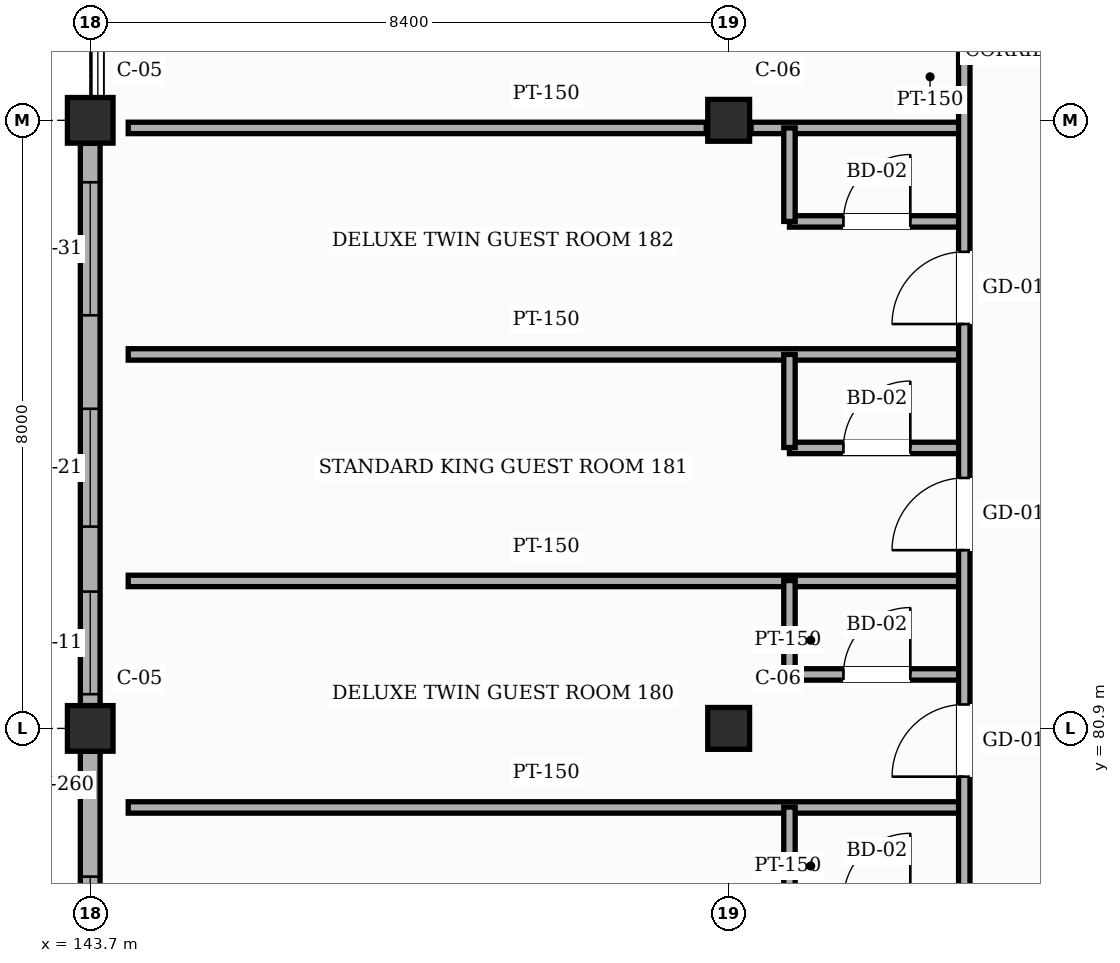
"""IFC4 building model, lengths in metres.
Left out: names, types, materials, properties, quantities, classifications, styles, units other than length and angle.
Written with IfcOpenShell. Run it as: python <this file> out.ifc"""

import sys

from ifc_helpers import new_model, si_unit, direction, frame, frame_2d, origin, origin_2d, place, context, subcontext, project, spatial, rectangle, hollow_rectangle, extrude, element, fill, save


model = new_model("IFC4")
c1 = context("Model", 3, precision=1e-05, world=origin(), true_north=direction((0.0, 1.0)))
c2 = subcontext(c1, "Body", "Model", "MODEL_VIEW")
j1 = project(units=[si_unit("LENGTHUNIT", "METRE"), si_unit("PLANEANGLEUNIT", "RADIAN")], contexts=[c1])
p1 = place(None, origin())
s1 = spatial("IfcSite", under=j1, at=p1, CompositionType="ELEMENT")
p2 = place(p1, origin())
s2 = spatial("IfcBuilding", under=s1, at=p2, CompositionType="ELEMENT")
p3 = place(p2, frame((0.0, 0.0, 31.8)))
s3 = spatial("IfcBuildingStorey", under=s2, at=p3, CompositionType="ELEMENT", Elevation=31.8)
for number, where, z_axis, x_axis in (
    (1, (143.7, 80.9, 0.0), (0.0, 0.0, 1.0), (1.0, 0.0, 0.0)),
    (2, (143.7, 88.9, 0.0), (0.0, 0.0, 1.0), (1.0, 0.0, 0.0)),
):
    element("IfcColumn", number, at=place(p3, frame(where, z_axis=z_axis, x_axis=x_axis)), inside=s3, PredefinedType="COLUMN", context=c2, shape_type="SweptSolid", body=[
        extrude(hollow_rectangle(XDim=0.6, YDim=0.6, WallThickness=0.025, InnerFilletRadius=0.025, OuterFilletRadius=0.05, at=origin_2d()), origin(), (0.0, 0.0, 1.0), 3.6),
    ])
for number, where, z_axis, x_axis in (
    (3, (152.1, 80.9, 0.0), (0.0, 0.0, 1.0), (1.0, 0.0, 0.0)),
    (4, (152.1, 88.9, 0.0), (0.0, 0.0, 1.0), (1.0, 0.0, 0.0)),
):
    element("IfcColumn", number, at=place(p3, frame(where, z_axis=z_axis, x_axis=x_axis)), inside=s3, PredefinedType="COLUMN", context=c2, shape_type="SweptSolid", body=[
        extrude(hollow_rectangle(XDim=0.55, YDim=0.55, WallThickness=0.022, InnerFilletRadius=0.022, OuterFilletRadius=0.044, at=origin_2d()), origin(), (0.0, 0.0, 1.0), 3.6),
    ])
p4 = place(p3, frame((143.7, 73.65, 0.0), z_axis=(0.0, 0.0, 1.0), x_axis=(0.0, 1.0, 0.0)))
e5 = element("IfcWall", 5, at=p4, inside=s3, PredefinedType="SOLIDWALL", context=c2, shape_type="SweptSolid", body=[
    extrude(rectangle(XDim=6.95, YDim=0.26, at=frame_2d((3.475, 0.0))), origin(), (0.0, 0.0, 1.0), 2.805),
])
p5 = place(p4, frame((0.7, 0.0, 0.85)))
e6 = element("IfcOpeningElement", 6, at=p5, cuts=e5, PredefinedType="OPENING", context=c2, shape_type="SweptSolid", body=[
    extrude(rectangle(XDim=2.1, YDim=1.35, at=frame_2d((1.05, 0.675))), frame((0.0, 0.14, 0.0), z_axis=(0.0, -1.0, 0.0), x_axis=(1.0, 0.0, 0.0)), (0.0, 0.0, 1.0), 0.28),
])
p6 = place(p4, frame((4.15, 0.0, 0.85)))
e7 = element("IfcOpeningElement", 7, at=p6, cuts=e5, PredefinedType="OPENING", context=c2, shape_type="SweptSolid", body=[
    extrude(rectangle(XDim=1.15, YDim=1.35, at=frame_2d((0.575, 0.675))), frame((0.0, 0.14, 0.0), z_axis=(0.0, -1.0, 0.0), x_axis=(1.0, 0.0, 0.0)), (0.0, 0.0, 1.0), 0.28),
])
p7 = place(p3, frame((143.7, 81.2, 0.0), z_axis=(0.0, 0.0, 1.0), x_axis=(0.0, 1.0, 0.0)))
e8 = element("IfcWall", 8, at=p7, inside=s3, PredefinedType="SOLIDWALL", context=c2, shape_type="SweptSolid", body=[
    extrude(rectangle(XDim=7.4, YDim=0.26, at=frame_2d((3.7, 0.0))), origin(), (0.0, 0.0, 1.0), 2.805),
])
p8 = place(p7, frame((0.15, 0.0, 0.85)))
e9 = element("IfcOpeningElement", 9, at=p8, cuts=e8, PredefinedType="OPENING", context=c2, shape_type="SweptSolid", body=[
    extrude(rectangle(XDim=1.35, YDim=1.35, at=frame_2d((0.675, 0.675))), frame((0.0, 0.14, 0.0), z_axis=(0.0, -1.0, 0.0), x_axis=(1.0, 0.0, 0.0)), (0.0, 0.0, 1.0), 0.28),
])
p9 = place(p7, frame((2.355, 0.0, 0.85)))
e10 = element("IfcOpeningElement", 10, at=p9, cuts=e8, PredefinedType="OPENING", context=c2, shape_type="SweptSolid", body=[
    extrude(rectangle(XDim=1.55, YDim=1.35, at=frame_2d((0.775, 0.675))), frame((0.0, 0.14, 0.0), z_axis=(0.0, -1.0, 0.0), x_axis=(1.0, 0.0, 0.0)), (0.0, 0.0, 1.0), 0.28),
])
p10 = place(p7, frame((5.135, 0.0, 0.85)))
e11 = element("IfcOpeningElement", 11, at=p10, cuts=e8, PredefinedType="OPENING", context=c2, shape_type="SweptSolid", body=[
    extrude(rectangle(XDim=1.75, YDim=1.35, at=frame_2d((0.875, 0.675))), frame((0.0, 0.14, 0.0), z_axis=(0.0, -1.0, 0.0), x_axis=(1.0, 0.0, 0.0)), (0.0, 0.0, 1.0), 0.28),
])
p11 = place(p3, frame((144.2, 79.86, 0.0), z_axis=(0.0, 0.0, 1.0), x_axis=(1.0, 0.0, 0.0)))
e12 = element("IfcWall", 12, at=p11, inside=s3, PredefinedType="PARTITIONING", context=c2, shape_type="SweptSolid", body=[
    extrude(rectangle(XDim=11.0, YDim=0.15, at=frame_2d((5.5, 0.0))), origin(), (0.0, 0.0, 1.0), 3.365),
])
p12 = place(p3, frame((152.9, 81.61, 0.0), z_axis=(0.0, 0.0, 1.0), x_axis=(1.0, 0.0, 0.0)))
e13 = element("IfcWall", 13, at=p12, inside=s3, PredefinedType="PARTITIONING", context=c2, shape_type="SweptSolid", body=[
    extrude(rectangle(XDim=2.3, YDim=0.15, at=frame_2d((1.15, 0.0))), origin(), (0.0, 0.0, 1.0), 3.365),
])
p13 = place(p12, frame((0.71, 0.0, 0.0)))
e14 = element("IfcOpeningElement", 14, at=p13, cuts=e13, PredefinedType="OPENING", context=c2, shape_type="SweptSolid", body=[
    extrude(rectangle(XDim=0.88, YDim=2.12, at=frame_2d((0.44, 1.06))), frame((0.0, 0.085, 0.0), z_axis=(0.0, -1.0, 0.0), x_axis=(1.0, 0.0, 0.0)), (0.0, 0.0, 1.0), 0.17),
])
p14 = place(p3, frame((144.2, 82.84, 0.0), z_axis=(0.0, 0.0, 1.0), x_axis=(1.0, 0.0, 0.0)))
e15 = element("IfcWall", 15, at=p14, inside=s3, PredefinedType="PARTITIONING", context=c2, shape_type="SweptSolid", body=[
    extrude(rectangle(XDim=11.0, YDim=0.15, at=frame_2d((5.5, 0.0))), origin(), (0.0, 0.0, 1.0), 3.365),
])
p15 = place(p3, frame((152.9, 84.59, 0.0), z_axis=(0.0, 0.0, 1.0), x_axis=(1.0, 0.0, 0.0)))
e16 = element("IfcWall", 16, at=p15, inside=s3, PredefinedType="PARTITIONING", context=c2, shape_type="SweptSolid", body=[
    extrude(rectangle(XDim=2.3, YDim=0.15, at=frame_2d((1.15, 0.0))), origin(), (0.0, 0.0, 1.0), 3.005),
])
p16 = place(p15, frame((0.71, 0.0, 0.0)))
e17 = element("IfcOpeningElement", 17, at=p16, cuts=e16, PredefinedType="OPENING", context=c2, shape_type="SweptSolid", body=[
    extrude(rectangle(XDim=0.88, YDim=2.12, at=frame_2d((0.44, 1.06))), frame((0.0, 0.085, 0.0), z_axis=(0.0, -1.0, 0.0), x_axis=(1.0, 0.0, 0.0)), (0.0, 0.0, 1.0), 0.17),
])
p17 = place(p3, frame((144.2, 85.82, 0.0), z_axis=(0.0, 0.0, 1.0), x_axis=(1.0, 0.0, 0.0)))
e18 = element("IfcWall", 18, at=p17, inside=s3, PredefinedType="PARTITIONING", context=c2, shape_type="SweptSolid", body=[
    extrude(rectangle(XDim=11.0, YDim=0.15, at=frame_2d((5.5, 0.0))), origin(), (0.0, 0.0, 1.0), 3.365),
])
p18 = place(p3, frame((152.9, 87.57, 0.0), z_axis=(0.0, 0.0, 1.0), x_axis=(1.0, 0.0, 0.0)))
e19 = element("IfcWall", 19, at=p18, inside=s3, PredefinedType="PARTITIONING", context=c2, shape_type="SweptSolid", body=[
    extrude(rectangle(XDim=2.3, YDim=0.15, at=frame_2d((1.15, 0.0))), origin(), (0.0, 0.0, 1.0), 3.365),
])
p19 = place(p18, frame((0.71, 0.0, 0.0)))
e20 = element("IfcOpeningElement", 20, at=p19, cuts=e19, PredefinedType="OPENING", context=c2, shape_type="SweptSolid", body=[
    extrude(rectangle(XDim=0.88, YDim=2.12, at=frame_2d((0.44, 1.06))), frame((0.0, 0.085, 0.0), z_axis=(0.0, -1.0, 0.0), x_axis=(1.0, 0.0, 0.0)), (0.0, 0.0, 1.0), 0.17),
])
p20 = place(p3, frame((144.2, 88.8, 0.0), z_axis=(0.0, 0.0, 1.0), x_axis=(1.0, 0.0, 0.0)))
e21 = element("IfcWall", 21, at=p20, inside=s3, PredefinedType="PARTITIONING", context=c2, shape_type="SweptSolid", body=[
    extrude(rectangle(XDim=7.605, YDim=0.15, at=frame_2d((3.802, 0.0))), origin(), (0.0, 0.0, 1.0), 2.755),
])
p21 = place(p3, frame((152.395, 88.8, 0.0), z_axis=(0.0, 0.0, 1.0), x_axis=(1.0, 0.0, 0.0)))
e22 = element("IfcWall", 22, at=p21, inside=s3, PredefinedType="PARTITIONING", context=c2, shape_type="SweptSolid", body=[
    extrude(rectangle(XDim=2.805, YDim=0.15, at=frame_2d((1.402, 0.0))), origin(), (0.0, 0.0, 1.0), 2.755),
])
p22 = place(p3, frame((152.9, 78.64, 0.0), z_axis=(0.0, 0.0, 1.0), x_axis=(0.0, 1.0, 0.0)))
e23 = element("IfcWall", 23, at=p22, inside=s3, PredefinedType="PARTITIONING", context=c2, shape_type="SweptSolid", body=[
    extrude(rectangle(XDim=1.225, YDim=0.15, at=frame_2d((0.613, 0.0))), origin(), (0.0, 0.0, 1.0), 3.365),
])
p23 = place(p3, frame((152.9, 81.615, 0.0), z_axis=(0.0, 0.0, 1.0), x_axis=(0.0, 1.0, 0.0)))
e24 = element("IfcWall", 24, at=p23, inside=s3, PredefinedType="PARTITIONING", context=c2, shape_type="SweptSolid", body=[
    extrude(rectangle(XDim=1.23, YDim=0.15, at=frame_2d((0.615, 0.0))), origin(), (0.0, 0.0, 1.0), 3.365),
])
p24 = place(p3, frame((152.9, 84.595, 0.0), z_axis=(0.0, 0.0, 1.0), x_axis=(0.0, 1.0, 0.0)))
e25 = element("IfcWall", 25, at=p24, inside=s3, PredefinedType="PARTITIONING", context=c2, shape_type="SweptSolid", body=[
    extrude(rectangle(XDim=1.225, YDim=0.15, at=frame_2d((0.613, 0.0))), origin(), (0.0, 0.0, 1.0), 3.365),
])
p25 = place(p3, frame((152.9, 87.57, 0.0), z_axis=(0.0, 0.0, 1.0), x_axis=(0.0, 1.0, 0.0)))
e26 = element("IfcWall", 26, at=p25, inside=s3, PredefinedType="PARTITIONING", context=c2, shape_type="SweptSolid", body=[
    extrude(rectangle(XDim=1.23, YDim=0.15, at=frame_2d((0.615, 0.0))), origin(), (0.0, 0.0, 1.0), 3.365),
])
p26 = place(p3, frame((155.2, 62.0, 0.0), z_axis=(0.0, 0.0, 1.0), x_axis=(0.0, 1.0, 0.0)))
e27 = element("IfcWall", 27, at=p26, inside=s3, PredefinedType="PARTITIONING", context=c2, shape_type="SweptSolid", body=[
    extrude(rectangle(XDim=34.4, YDim=0.15, at=frame_2d((17.2, 0.0))), origin(), (0.0, 0.0, 1.0), 3.365),
])
p27 = place(p26, frame((29.775, 0.0, 0.0)))
e28 = element("IfcOpeningElement", 28, at=p27, cuts=e27, PredefinedType="OPENING", context=c2, shape_type="SweptSolid", body=[
    extrude(rectangle(XDim=1.65, YDim=2.35, at=frame_2d((0.825, 1.175))), frame((0.0, 0.085, 0.0), z_axis=(0.0, -1.0, 0.0), x_axis=(1.0, 0.0, 0.0)), (0.0, 0.0, 1.0), 0.17),
])
p28 = place(p26, frame((0.4, 0.0, 0.0)))
e29 = element("IfcOpeningElement", 29, at=p28, cuts=e27, PredefinedType="OPENING", context=c2, shape_type="SweptSolid", body=[
    extrude(rectangle(XDim=0.95, YDim=2.15, at=frame_2d((0.475, 1.075))), frame((0.0, 0.085, 0.0), z_axis=(0.0, -1.0, 0.0), x_axis=(1.0, 0.0, 0.0)), (0.0, 0.0, 1.0), 0.17),
])
p29 = place(p26, frame((3.38, 0.0, 0.0)))
e30 = element("IfcOpeningElement", 30, at=p29, cuts=e27, PredefinedType="OPENING", context=c2, shape_type="SweptSolid", body=[
    extrude(rectangle(XDim=0.95, YDim=2.15, at=frame_2d((0.475, 1.075))), frame((0.0, 0.085, 0.0), z_axis=(0.0, -1.0, 0.0), x_axis=(1.0, 0.0, 0.0)), (0.0, 0.0, 1.0), 0.17),
])
p30 = place(p26, frame((6.355, 0.0, 0.0)))
e31 = element("IfcOpeningElement", 31, at=p30, cuts=e27, PredefinedType="OPENING", context=c2, shape_type="SweptSolid", body=[
    extrude(rectangle(XDim=0.95, YDim=2.15, at=frame_2d((0.475, 1.075))), frame((0.0, 0.085, 0.0), z_axis=(0.0, -1.0, 0.0), x_axis=(1.0, 0.0, 0.0)), (0.0, 0.0, 1.0), 0.17),
])
p31 = place(p26, frame((9.335, 0.0, 0.0)))
e32 = element("IfcOpeningElement", 32, at=p31, cuts=e27, PredefinedType="OPENING", context=c2, shape_type="SweptSolid", body=[
    extrude(rectangle(XDim=0.95, YDim=2.15, at=frame_2d((0.475, 1.075))), frame((0.0, 0.085, 0.0), z_axis=(0.0, -1.0, 0.0), x_axis=(1.0, 0.0, 0.0)), (0.0, 0.0, 1.0), 0.17),
])
p32 = place(p26, frame((12.31, 0.0, 0.0)))
e33 = element("IfcOpeningElement", 33, at=p32, cuts=e27, PredefinedType="OPENING", context=c2, shape_type="SweptSolid", body=[
    extrude(rectangle(XDim=0.95, YDim=2.15, at=frame_2d((0.475, 1.075))), frame((0.0, 0.085, 0.0), z_axis=(0.0, -1.0, 0.0), x_axis=(1.0, 0.0, 0.0)), (0.0, 0.0, 1.0), 0.17),
])
p33 = place(p26, frame((15.29, 0.0, 0.0)))
e34 = element("IfcOpeningElement", 34, at=p33, cuts=e27, PredefinedType="OPENING", context=c2, shape_type="SweptSolid", body=[
    extrude(rectangle(XDim=0.95, YDim=2.15, at=frame_2d((0.475, 1.075))), frame((0.0, 0.085, 0.0), z_axis=(0.0, -1.0, 0.0), x_axis=(1.0, 0.0, 0.0)), (0.0, 0.0, 1.0), 0.17),
])
p34 = place(p26, frame((18.265, 0.0, 0.0)))
e35 = element("IfcOpeningElement", 35, at=p34, cuts=e27, PredefinedType="OPENING", context=c2, shape_type="SweptSolid", body=[
    extrude(rectangle(XDim=0.95, YDim=2.15, at=frame_2d((0.475, 1.075))), frame((0.0, 0.085, 0.0), z_axis=(0.0, -1.0, 0.0), x_axis=(1.0, 0.0, 0.0)), (0.0, 0.0, 1.0), 0.17),
])
p35 = place(p26, frame((21.245, 0.0, 0.0)))
e36 = element("IfcOpeningElement", 36, at=p35, cuts=e27, PredefinedType="OPENING", context=c2, shape_type="SweptSolid", body=[
    extrude(rectangle(XDim=0.95, YDim=2.15, at=frame_2d((0.475, 1.075))), frame((0.0, 0.085, 0.0), z_axis=(0.0, -1.0, 0.0), x_axis=(1.0, 0.0, 0.0)), (0.0, 0.0, 1.0), 0.17),
])
p36 = place(p26, frame((24.22, 0.0, 0.0)))
e37 = element("IfcOpeningElement", 37, at=p36, cuts=e27, PredefinedType="OPENING", context=c2, shape_type="SweptSolid", body=[
    extrude(rectangle(XDim=0.95, YDim=2.15, at=frame_2d((0.475, 1.075))), frame((0.0, 0.085, 0.0), z_axis=(0.0, -1.0, 0.0), x_axis=(1.0, 0.0, 0.0)), (0.0, 0.0, 1.0), 0.17),
])
p37 = place(p6, origin())
e38 = element("IfcWindow", 38, at=p37, inside=s3, PartitioningType="SINGLE_PANEL", PredefinedType="WINDOW", context=c2, shape_type="SweptSolid", body=[
    extrude(rectangle(XDim=1.15, YDim=1.35, at=frame_2d((0.575, 0.675))), frame((0.0, 0.03, 0.0), z_axis=(0.0, -1.0, 0.0), x_axis=(1.0, 0.0, 0.0)), (0.0, 0.0, 1.0), 0.06),
])
fill(e7, e38)
p38 = place(p8, origin())
e39 = element("IfcWindow", 39, at=p38, inside=s3, PartitioningType="SINGLE_PANEL", PredefinedType="WINDOW", context=c2, shape_type="SweptSolid", body=[
    extrude(rectangle(XDim=1.35, YDim=1.35, at=frame_2d((0.675, 0.675))), frame((0.0, 0.03, 0.0), z_axis=(0.0, -1.0, 0.0), x_axis=(1.0, 0.0, 0.0)), (0.0, 0.0, 1.0), 0.06),
])
fill(e9, e39)
p39 = place(p9, origin())
e40 = element("IfcWindow", 40, at=p39, inside=s3, PartitioningType="SINGLE_PANEL", PredefinedType="WINDOW", context=c2, shape_type="SweptSolid", body=[
    extrude(rectangle(XDim=1.55, YDim=1.35, at=frame_2d((0.775, 0.675))), frame((0.0, 0.03, 0.0), z_axis=(0.0, -1.0, 0.0), x_axis=(1.0, 0.0, 0.0)), (0.0, 0.0, 1.0), 0.06),
])
fill(e10, e40)
p40 = place(p10, origin())
e41 = element("IfcWindow", 41, at=p40, inside=s3, PartitioningType="SINGLE_PANEL", PredefinedType="WINDOW", context=c2, shape_type="SweptSolid", body=[
    extrude(rectangle(XDim=1.75, YDim=1.35, at=frame_2d((0.875, 0.675))), frame((0.0, 0.03, 0.0), z_axis=(0.0, -1.0, 0.0), x_axis=(1.0, 0.0, 0.0)), (0.0, 0.0, 1.0), 0.06),
])
fill(e11, e41)
p41 = place(p34, origin())
e42 = element("IfcDoor", 42, at=p41, inside=s3, OperationType="SINGLE_SWING_LEFT", PredefinedType="DOOR", context=c2, shape_type="SweptSolid", body=[
    extrude(rectangle(XDim=0.95, YDim=2.15, at=frame_2d((0.475, 1.075))), frame((0.0, 0.025, 0.0), z_axis=(0.0, -1.0, 0.0), x_axis=(1.0, 0.0, 0.0)), (0.0, 0.0, 1.0), 0.05),
])
fill(e35, e42)
p42 = place(p13, origin())
e43 = element("IfcDoor", 43, at=p42, inside=s3, OperationType="SINGLE_SWING_RIGHT", PredefinedType="DOOR", context=c2, shape_type="SweptSolid", body=[
    extrude(rectangle(XDim=0.88, YDim=2.12, at=frame_2d((0.44, 1.06))), frame((0.0, 0.025, 0.0), z_axis=(0.0, -1.0, 0.0), x_axis=(1.0, 0.0, 0.0)), (0.0, 0.0, 1.0), 0.05),
])
fill(e14, e43)
p43 = place(p35, origin())
e44 = element("IfcDoor", 44, at=p43, inside=s3, OperationType="SINGLE_SWING_LEFT", PredefinedType="DOOR", context=c2, shape_type="SweptSolid", body=[
    extrude(rectangle(XDim=0.95, YDim=2.15, at=frame_2d((0.475, 1.075))), frame((0.0, 0.025, 0.0), z_axis=(0.0, -1.0, 0.0), x_axis=(1.0, 0.0, 0.0)), (0.0, 0.0, 1.0), 0.05),
])
fill(e36, e44)
p44 = place(p16, origin())
e45 = element("IfcDoor", 45, at=p44, inside=s3, OperationType="SINGLE_SWING_RIGHT", PredefinedType="DOOR", context=c2, shape_type="SweptSolid", body=[
    extrude(rectangle(XDim=0.88, YDim=2.12, at=frame_2d((0.44, 1.06))), frame((0.0, 0.025, 0.0), z_axis=(0.0, -1.0, 0.0), x_axis=(1.0, 0.0, 0.0)), (0.0, 0.0, 1.0), 0.05),
])
fill(e17, e45)
p45 = place(p36, origin())
e46 = element("IfcDoor", 46, at=p45, inside=s3, OperationType="SINGLE_SWING_LEFT", PredefinedType="DOOR", context=c2, shape_type="SweptSolid", body=[
    extrude(rectangle(XDim=0.95, YDim=2.15, at=frame_2d((0.475, 1.075))), frame((0.0, 0.025, 0.0), z_axis=(0.0, -1.0, 0.0), x_axis=(1.0, 0.0, 0.0)), (0.0, 0.0, 1.0), 0.05),
])
fill(e37, e46)
p46 = place(p19, origin())
e47 = element("IfcDoor", 47, at=p46, inside=s3, OperationType="SINGLE_SWING_RIGHT", PredefinedType="DOOR", context=c2, shape_type="SweptSolid", body=[
    extrude(rectangle(XDim=0.88, YDim=2.12, at=frame_2d((0.44, 1.06))), frame((0.0, 0.025, 0.0), z_axis=(0.0, -1.0, 0.0), x_axis=(1.0, 0.0, 0.0)), (0.0, 0.0, 1.0), 0.05),
])
fill(e20, e47)
save(model, sys.argv[1])
